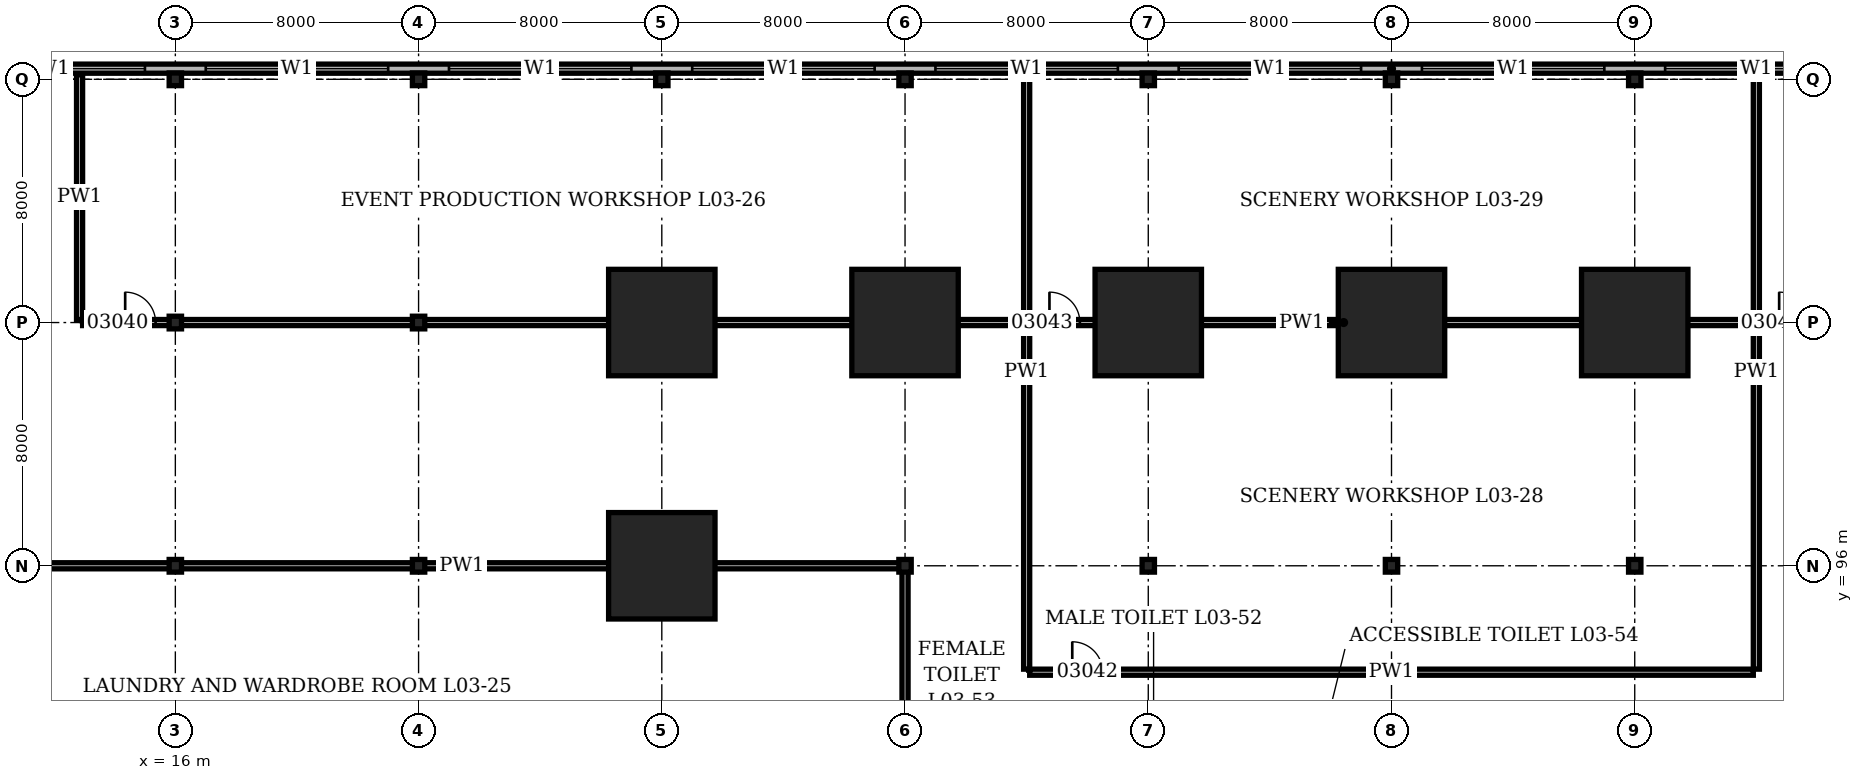
"""IFC4 building model, lengths in metres.
Left out: names, types, materials, properties, quantities, classifications, styles, units other than length and angle.
Written with IfcOpenShell. Run it as: python <this file> out.ifc"""

import sys

from ifc_helpers import new_model, si_unit, direction, frame, frame_2d, origin, origin_2d, place, context, subcontext, project, spatial, rectangle, hollow_rectangle, i_section, extrude, element, fill, save


model = new_model("IFC4")
c1 = context("Model", 3, precision=1e-05, world=origin(), true_north=direction((0.0, 1.0)))
c2 = subcontext(c1, "Body", "Model", "MODEL_VIEW")
j1 = project(units=[si_unit("LENGTHUNIT", "METRE"), si_unit("PLANEANGLEUNIT", "RADIAN")], contexts=[c1])
p1 = place(None, origin())
s1 = spatial("IfcSite", under=j1, at=p1, CompositionType="ELEMENT")
p2 = place(p1, origin())
s2 = spatial("IfcBuilding", under=s1, at=p2, CompositionType="ELEMENT")
p3 = place(p2, frame((0.0, 0.0, 14.9)))
s3 = spatial("IfcBuildingStorey", under=s2, at=p3, CompositionType="ELEMENT", Elevation=14.9)
for number, where, z_axis, x_axis in (
    (1, (16.0, 96.0, 0.0), (0.0, 0.0, 1.0), (1.0, 0.0, 0.0)),
    (2, (16.0, 104.0, 0.0), (0.0, 0.0, 1.0), (1.0, 0.0, 0.0)),
    (3, (16.0, 112.0, 0.0), (0.0, 0.0, 1.0), (1.0, 0.0, 0.0)),
    (4, (24.0, 96.0, 0.0), (0.0, 0.0, 1.0), (1.0, 0.0, 0.0)),
    (5, (24.0, 104.0, 0.0), (0.0, 0.0, 1.0), (1.0, 0.0, 0.0)),
    (6, (24.0, 112.0, 0.0), (0.0, 0.0, 1.0), (1.0, 0.0, 0.0)),
):
    element("IfcColumn", number, at=place(p3, frame(where, z_axis=z_axis, x_axis=x_axis)), inside=s3, PredefinedType="COLUMN", context=c2, shape_type="SweptSolid", body=[
        extrude(i_section(OverallWidth=0.406, OverallDepth=0.417, WebThickness=0.03, FlangeThickness=0.048, at=origin_2d()), origin(), (0.0, 0.0, 1.0), 5.0),
    ])
for number, where, z_axis, x_axis in (
    (7, (32.0, 96.0, 0.0), (0.0, 0.0, 1.0), (1.0, 0.0, 0.0)),
    (8, (32.0, 104.0, 0.0), (0.0, 0.0, 1.0), (1.0, 0.0, 0.0)),
):
    element("IfcColumn", number, at=place(p3, frame(where, z_axis=z_axis, x_axis=x_axis)), inside=s3, PredefinedType="COLUMN", context=c2, shape_type="SweptSolid", body=[
        extrude(hollow_rectangle(XDim=3.5, YDim=3.5, WallThickness=0.5, at=origin_2d()), origin(), (0.0, 0.0, 1.0), 5.0),
    ])
for number, where, z_axis, x_axis in (
    (9, (32.0, 112.0, 0.0), (0.0, 0.0, 1.0), (1.0, 0.0, 0.0)),
    (10, (40.0, 96.0, 0.0), (0.0, 0.0, 1.0), (1.0, 0.0, 0.0)),
):
    element("IfcColumn", number, at=place(p3, frame(where, z_axis=z_axis, x_axis=x_axis)), inside=s3, PredefinedType="COLUMN", context=c2, shape_type="SweptSolid", body=[
        extrude(i_section(OverallWidth=0.406, OverallDepth=0.417, WebThickness=0.03, FlangeThickness=0.048, at=origin_2d()), origin(), (0.0, 0.0, 1.0), 5.0),
    ])
p4 = place(p3, frame((40.0, 104.0, 0.0), z_axis=(0.0, 0.0, 1.0), x_axis=(1.0, 0.0, 0.0)))
e11 = element("IfcColumn", 11, at=p4, inside=s3, PredefinedType="COLUMN", context=c2, shape_type="SweptSolid", body=[
    extrude(hollow_rectangle(XDim=3.5, YDim=3.5, WallThickness=0.5, at=origin_2d()), origin(), (0.0, 0.0, 1.0), 5.0),
])
for number, where, z_axis, x_axis in (
    (12, (40.0, 112.0, 0.0), (0.0, 0.0, 1.0), (1.0, 0.0, 0.0)),
    (13, (48.0, 96.0, 0.0), (0.0, 0.0, 1.0), (1.0, 0.0, 0.0)),
):
    element("IfcColumn", number, at=place(p3, frame(where, z_axis=z_axis, x_axis=x_axis)), inside=s3, PredefinedType="COLUMN", context=c2, shape_type="SweptSolid", body=[
        extrude(i_section(OverallWidth=0.406, OverallDepth=0.417, WebThickness=0.03, FlangeThickness=0.048, at=origin_2d()), origin(), (0.0, 0.0, 1.0), 5.0),
    ])
p5 = place(p3, frame((48.0, 104.0, 0.0), z_axis=(0.0, 0.0, 1.0), x_axis=(1.0, 0.0, 0.0)))
e14 = element("IfcColumn", 14, at=p5, inside=s3, PredefinedType="COLUMN", context=c2, shape_type="SweptSolid", body=[
    extrude(hollow_rectangle(XDim=3.5, YDim=3.5, WallThickness=0.5, at=origin_2d()), origin(), (0.0, 0.0, 1.0), 5.0),
])
for number, where, z_axis, x_axis in (
    (15, (48.0, 112.0, 0.0), (0.0, 0.0, 1.0), (1.0, 0.0, 0.0)),
    (16, (56.0, 96.0, 0.0), (0.0, 0.0, 1.0), (1.0, 0.0, 0.0)),
):
    element("IfcColumn", number, at=place(p3, frame(where, z_axis=z_axis, x_axis=x_axis)), inside=s3, PredefinedType="COLUMN", context=c2, shape_type="SweptSolid", body=[
        extrude(i_section(OverallWidth=0.406, OverallDepth=0.417, WebThickness=0.03, FlangeThickness=0.048, at=origin_2d()), origin(), (0.0, 0.0, 1.0), 5.0),
    ])
p6 = place(p3, frame((56.0, 104.0, 0.0), z_axis=(0.0, 0.0, 1.0), x_axis=(1.0, 0.0, 0.0)))
e17 = element("IfcColumn", 17, at=p6, inside=s3, PredefinedType="COLUMN", context=c2, shape_type="SweptSolid", body=[
    extrude(hollow_rectangle(XDim=3.5, YDim=3.5, WallThickness=0.5, at=origin_2d()), origin(), (0.0, 0.0, 1.0), 5.0),
])
for number, where, z_axis, x_axis in (
    (18, (56.0, 112.0, 0.0), (0.0, 0.0, 1.0), (1.0, 0.0, 0.0)),
    (19, (64.0, 96.0, 0.0), (0.0, 0.0, 1.0), (1.0, 0.0, 0.0)),
):
    element("IfcColumn", number, at=place(p3, frame(where, z_axis=z_axis, x_axis=x_axis)), inside=s3, PredefinedType="COLUMN", context=c2, shape_type="SweptSolid", body=[
        extrude(i_section(OverallWidth=0.406, OverallDepth=0.417, WebThickness=0.03, FlangeThickness=0.048, at=origin_2d()), origin(), (0.0, 0.0, 1.0), 5.0),
    ])
p7 = place(p3, frame((64.0, 104.0, 0.0), z_axis=(0.0, 0.0, 1.0), x_axis=(1.0, 0.0, 0.0)))
e20 = element("IfcColumn", 20, at=p7, inside=s3, PredefinedType="COLUMN", context=c2, shape_type="SweptSolid", body=[
    extrude(hollow_rectangle(XDim=3.5, YDim=3.5, WallThickness=0.5, at=origin_2d()), origin(), (0.0, 0.0, 1.0), 5.0),
])
p8 = place(p3, frame((64.0, 112.0, 0.0), z_axis=(0.0, 0.0, 1.0), x_axis=(1.0, 0.0, 0.0)))
e21 = element("IfcColumn", 21, at=p8, inside=s3, PredefinedType="COLUMN", context=c2, shape_type="SweptSolid", body=[
    extrude(i_section(OverallWidth=0.406, OverallDepth=0.417, WebThickness=0.03, FlangeThickness=0.048, at=origin_2d()), origin(), (0.0, 0.0, 1.0), 5.0),
])
p9 = place(p3, frame((112.35, 112.35, 0.0), z_axis=(0.0, 0.0, 1.0), x_axis=(-1.0, 0.0, 0.0)))
e22 = element("IfcWall", 22, at=p9, inside=s3, PredefinedType="SOLIDWALL", context=c2, shape_type="SweptSolid", body=[
    extrude(rectangle(XDim=112.7, YDim=0.3, at=frame_2d((56.35, 0.0))), origin(), (0.0, 0.0, 1.0), 5.0),
])
p10 = place(p9, frame((1.35, 0.0, 1.0)))
e23 = element("IfcOpeningElement", 23, at=p10, cuts=e22, PredefinedType="OPENING", context=c2, shape_type="SweptSolid", body=[
    extrude(rectangle(XDim=6.0, YDim=1.5, at=frame_2d((3.0, 0.75))), frame((0.0, 0.16, 0.0), z_axis=(0.0, -1.0, 0.0), x_axis=(1.0, 0.0, 0.0)), (0.0, 0.0, 1.0), 0.32),
])
p11 = place(p9, frame((9.35, 0.0, 1.0)))
e24 = element("IfcOpeningElement", 24, at=p11, cuts=e22, PredefinedType="OPENING", context=c2, shape_type="SweptSolid", body=[
    extrude(rectangle(XDim=6.0, YDim=1.5, at=frame_2d((3.0, 0.75))), frame((0.0, 0.16, 0.0), z_axis=(0.0, -1.0, 0.0), x_axis=(1.0, 0.0, 0.0)), (0.0, 0.0, 1.0), 0.32),
])
p12 = place(p9, frame((17.35, 0.0, 1.0)))
e25 = element("IfcOpeningElement", 25, at=p12, cuts=e22, PredefinedType="OPENING", context=c2, shape_type="SweptSolid", body=[
    extrude(rectangle(XDim=6.0, YDim=1.5, at=frame_2d((3.0, 0.75))), frame((0.0, 0.16, 0.0), z_axis=(0.0, -1.0, 0.0), x_axis=(1.0, 0.0, 0.0)), (0.0, 0.0, 1.0), 0.32),
])
p13 = place(p9, frame((25.35, 0.0, 1.0)))
e26 = element("IfcOpeningElement", 26, at=p13, cuts=e22, PredefinedType="OPENING", context=c2, shape_type="SweptSolid", body=[
    extrude(rectangle(XDim=6.0, YDim=1.5, at=frame_2d((3.0, 0.75))), frame((0.0, 0.16, 0.0), z_axis=(0.0, -1.0, 0.0), x_axis=(1.0, 0.0, 0.0)), (0.0, 0.0, 1.0), 0.32),
])
p14 = place(p9, frame((33.35, 0.0, 1.0)))
e27 = element("IfcOpeningElement", 27, at=p14, cuts=e22, PredefinedType="OPENING", context=c2, shape_type="SweptSolid", body=[
    extrude(rectangle(XDim=6.0, YDim=1.5, at=frame_2d((3.0, 0.75))), frame((0.0, 0.16, 0.0), z_axis=(0.0, -1.0, 0.0), x_axis=(1.0, 0.0, 0.0)), (0.0, 0.0, 1.0), 0.32),
])
p15 = place(p9, frame((41.35, 0.0, 1.0)))
e28 = element("IfcOpeningElement", 28, at=p15, cuts=e22, PredefinedType="OPENING", context=c2, shape_type="SweptSolid", body=[
    extrude(rectangle(XDim=6.0, YDim=1.5, at=frame_2d((3.0, 0.75))), frame((0.0, 0.16, 0.0), z_axis=(0.0, -1.0, 0.0), x_axis=(1.0, 0.0, 0.0)), (0.0, 0.0, 1.0), 0.32),
])
p16 = place(p9, frame((49.35, 0.0, 1.0)))
e29 = element("IfcOpeningElement", 29, at=p16, cuts=e22, PredefinedType="OPENING", context=c2, shape_type="SweptSolid", body=[
    extrude(rectangle(XDim=6.0, YDim=1.5, at=frame_2d((3.0, 0.75))), frame((0.0, 0.16, 0.0), z_axis=(0.0, -1.0, 0.0), x_axis=(1.0, 0.0, 0.0)), (0.0, 0.0, 1.0), 0.32),
])
p17 = place(p9, frame((57.35, 0.0, 1.0)))
e30 = element("IfcOpeningElement", 30, at=p17, cuts=e22, PredefinedType="OPENING", context=c2, shape_type="SweptSolid", body=[
    extrude(rectangle(XDim=6.0, YDim=1.5, at=frame_2d((3.0, 0.75))), frame((0.0, 0.16, 0.0), z_axis=(0.0, -1.0, 0.0), x_axis=(1.0, 0.0, 0.0)), (0.0, 0.0, 1.0), 0.32),
])
p18 = place(p9, frame((65.35, 0.0, 1.0)))
e31 = element("IfcOpeningElement", 31, at=p18, cuts=e22, PredefinedType="OPENING", context=c2, shape_type="SweptSolid", body=[
    extrude(rectangle(XDim=6.0, YDim=1.5, at=frame_2d((3.0, 0.75))), frame((0.0, 0.16, 0.0), z_axis=(0.0, -1.0, 0.0), x_axis=(1.0, 0.0, 0.0)), (0.0, 0.0, 1.0), 0.32),
])
p19 = place(p9, frame((73.35, 0.0, 1.0)))
e32 = element("IfcOpeningElement", 32, at=p19, cuts=e22, PredefinedType="OPENING", context=c2, shape_type="SweptSolid", body=[
    extrude(rectangle(XDim=6.0, YDim=1.5, at=frame_2d((3.0, 0.75))), frame((0.0, 0.16, 0.0), z_axis=(0.0, -1.0, 0.0), x_axis=(1.0, 0.0, 0.0)), (0.0, 0.0, 1.0), 0.32),
])
p20 = place(p9, frame((81.35, 0.0, 1.0)))
e33 = element("IfcOpeningElement", 33, at=p20, cuts=e22, PredefinedType="OPENING", context=c2, shape_type="SweptSolid", body=[
    extrude(rectangle(XDim=6.0, YDim=1.5, at=frame_2d((3.0, 0.75))), frame((0.0, 0.16, 0.0), z_axis=(0.0, -1.0, 0.0), x_axis=(1.0, 0.0, 0.0)), (0.0, 0.0, 1.0), 0.32),
])
p21 = place(p9, frame((89.35, 0.0, 1.0)))
e34 = element("IfcOpeningElement", 34, at=p21, cuts=e22, PredefinedType="OPENING", context=c2, shape_type="SweptSolid", body=[
    extrude(rectangle(XDim=6.0, YDim=1.5, at=frame_2d((3.0, 0.75))), frame((0.0, 0.16, 0.0), z_axis=(0.0, -1.0, 0.0), x_axis=(1.0, 0.0, 0.0)), (0.0, 0.0, 1.0), 0.32),
])
p22 = place(p9, frame((97.35, 0.0, 1.0)))
e35 = element("IfcOpeningElement", 35, at=p22, cuts=e22, PredefinedType="OPENING", context=c2, shape_type="SweptSolid", body=[
    extrude(rectangle(XDim=6.0, YDim=1.5, at=frame_2d((3.0, 0.75))), frame((0.0, 0.16, 0.0), z_axis=(0.0, -1.0, 0.0), x_axis=(1.0, 0.0, 0.0)), (0.0, 0.0, 1.0), 0.32),
])
p23 = place(p9, frame((105.35, 0.0, 1.0)))
e36 = element("IfcOpeningElement", 36, at=p23, cuts=e22, PredefinedType="OPENING", context=c2, shape_type="SweptSolid", body=[
    extrude(rectangle(XDim=6.0, YDim=1.5, at=frame_2d((3.0, 0.75))), frame((0.0, 0.16, 0.0), z_axis=(0.0, -1.0, 0.0), x_axis=(1.0, 0.0, 0.0)), (0.0, 0.0, 1.0), 0.32),
])
p24 = place(p3, frame((44.1, 92.5, 0.0), z_axis=(0.0, 0.0, 1.0), x_axis=(1.0, 0.0, 0.0)))
e37 = element("IfcWall", 37, at=p24, inside=s3, PredefinedType="PARTITIONING", context=c2, shape_type="SweptSolid", body=[
    extrude(rectangle(XDim=23.8, YDim=0.2, at=frame_2d((11.9, 0.0))), origin(), (0.0, 0.0, 1.0), 4.8),
])
p25 = place(p24, frame((1.4, 0.0, 0.0)))
e38 = element("IfcOpeningElement", 38, at=p25, cuts=e37, PredefinedType="OPENING", context=c2, shape_type="SweptSolid", body=[
    extrude(rectangle(XDim=1.0, YDim=2.1, at=frame_2d((0.5, 1.05))), frame((0.0, 0.11, 0.0), z_axis=(0.0, -1.0, 0.0), x_axis=(1.0, 0.0, 0.0)), (0.0, 0.0, 1.0), 0.22),
])
p26 = place(p3, frame((10.95, 96.0, 0.0), z_axis=(0.0, 0.0, 1.0), x_axis=(1.0, 0.0, 0.0)))
e39 = element("IfcWall", 39, at=p26, inside=s3, PredefinedType="PARTITIONING", context=c2, shape_type="SweptSolid", body=[
    extrude(rectangle(XDim=28.95, YDim=0.2, at=frame_2d((14.475, 0.0))), origin(), (0.0, 0.0, 1.0), 4.028),
])
p27 = place(p3, frame((12.95, 104.0, 0.0), z_axis=(0.0, 0.0, 1.0), x_axis=(1.0, 0.0, 0.0)))
e40 = element("IfcWall", 40, at=p27, inside=s3, PredefinedType="PARTITIONING", context=c2, shape_type="SweptSolid", body=[
    extrude(rectangle(XDim=82.95, YDim=0.2, at=frame_2d((41.475, 0.0))), origin(), (0.0, 0.0, 1.0), 4.028),
])
p28 = place(p27, frame((1.4, 0.0, 0.0)))
e41 = element("IfcOpeningElement", 41, at=p28, cuts=e40, PredefinedType="OPENING", context=c2, shape_type="SweptSolid", body=[
    extrude(rectangle(XDim=1.0, YDim=2.1, at=frame_2d((0.5, 1.05))), frame((0.0, 0.11, 0.0), z_axis=(0.0, -1.0, 0.0), x_axis=(1.0, 0.0, 0.0)), (0.0, 0.0, 1.0), 0.22),
])
p29 = place(p27, frame((31.8, 0.0, 0.0)))
e42 = element("IfcOpeningElement", 42, at=p29, cuts=e40, PredefinedType="OPENING", context=c2, shape_type="SweptSolid", body=[
    extrude(rectangle(XDim=1.0, YDim=2.1, at=frame_2d((0.5, 1.05))), frame((0.0, 0.11, 0.0), z_axis=(0.0, -1.0, 0.0), x_axis=(1.0, 0.0, 0.0)), (0.0, 0.0, 1.0), 0.22),
])
p30 = place(p27, frame((55.8, 0.0, 0.0)))
e43 = element("IfcOpeningElement", 43, at=p30, cuts=e40, PredefinedType="OPENING", context=c2, shape_type="SweptSolid", body=[
    extrude(rectangle(XDim=1.0, YDim=2.1, at=frame_2d((0.5, 1.05))), frame((0.0, 0.11, 0.0), z_axis=(0.0, -1.0, 0.0), x_axis=(1.0, 0.0, 0.0)), (0.0, 0.0, 1.0), 0.22),
])
p31 = place(p3, frame((12.85, 104.1, 0.0), z_axis=(0.0, 0.0, 1.0), x_axis=(0.0, 1.0, 0.0)))
e44 = element("IfcWall", 44, at=p31, inside=s3, PredefinedType="PARTITIONING", context=c2, shape_type="SweptSolid", body=[
    extrude(rectangle(XDim=8.05, YDim=0.2, at=frame_2d((4.025, 0.0))), origin(), (0.0, 0.0, 1.0), 4.8),
])
p32 = place(p3, frame((40.0, 72.1, 0.0), z_axis=(0.0, 0.0, 1.0), x_axis=(0.0, 1.0, 0.0)))
e45 = element("IfcWall", 45, at=p32, inside=s3, PredefinedType="PARTITIONING", context=c2, shape_type="SweptSolid", body=[
    extrude(rectangle(XDim=23.8, YDim=0.2, at=frame_2d((11.9, 0.0))), origin(), (0.0, 0.0, 1.0), 4.028),
])
p33 = place(p32, frame((17.4, 0.0, 0.0)))
e46 = element("IfcOpeningElement", 46, at=p33, cuts=e45, PredefinedType="OPENING", context=c2, shape_type="SweptSolid", body=[
    extrude(rectangle(XDim=1.0, YDim=2.1, at=frame_2d((0.5, 1.05))), frame((0.0, 0.11, 0.0), z_axis=(0.0, -1.0, 0.0), x_axis=(1.0, 0.0, 0.0)), (0.0, 0.0, 1.0), 0.22),
])
for number, where, z_axis, x_axis in (
    (47, (44.0, 92.6, 0.0), (0.0, 0.0, 1.0), (0.0, 1.0, 0.0)),
    (48, (68.0, 92.6, 0.0), (0.0, 0.0, 1.0), (0.0, 1.0, 0.0)),
):
    element("IfcWall", number, at=place(p3, frame(where, z_axis=z_axis, x_axis=x_axis)), inside=s3, PredefinedType="PARTITIONING", context=c2, shape_type="SweptSolid", body=[
        extrude(rectangle(XDim=19.55, YDim=0.2, at=frame_2d((9.775, 0.0))), origin(), (0.0, 0.0, 1.0), 4.8),
    ])
p34 = place(p15, origin())
e49 = element("IfcWindow", 49, at=p34, inside=s3, PartitioningType="SINGLE_PANEL", PredefinedType="WINDOW", context=c2, shape_type="SweptSolid", body=[
    extrude(rectangle(XDim=6.0, YDim=1.5, at=frame_2d((3.0, 0.75))), frame((0.0, 0.03, 0.0), z_axis=(0.0, -1.0, 0.0), x_axis=(1.0, 0.0, 0.0)), (0.0, 0.0, 1.0), 0.06),
])
fill(e28, e49)
p35 = place(p16, origin())
e50 = element("IfcWindow", 50, at=p35, inside=s3, PartitioningType="SINGLE_PANEL", PredefinedType="WINDOW", context=c2, shape_type="SweptSolid", body=[
    extrude(rectangle(XDim=6.0, YDim=1.5, at=frame_2d((3.0, 0.75))), frame((0.0, 0.03, 0.0), z_axis=(0.0, -1.0, 0.0), x_axis=(1.0, 0.0, 0.0)), (0.0, 0.0, 1.0), 0.06),
])
fill(e29, e50)
p36 = place(p17, origin())
e51 = element("IfcWindow", 51, at=p36, inside=s3, PartitioningType="SINGLE_PANEL", PredefinedType="WINDOW", context=c2, shape_type="SweptSolid", body=[
    extrude(rectangle(XDim=6.0, YDim=1.5, at=frame_2d((3.0, 0.75))), frame((0.0, 0.03, 0.0), z_axis=(0.0, -1.0, 0.0), x_axis=(1.0, 0.0, 0.0)), (0.0, 0.0, 1.0), 0.06),
])
fill(e30, e51)
p37 = place(p18, origin())
e52 = element("IfcWindow", 52, at=p37, inside=s3, PartitioningType="SINGLE_PANEL", PredefinedType="WINDOW", context=c2, shape_type="SweptSolid", body=[
    extrude(rectangle(XDim=6.0, YDim=1.5, at=frame_2d((3.0, 0.75))), frame((0.0, 0.03, 0.0), z_axis=(0.0, -1.0, 0.0), x_axis=(1.0, 0.0, 0.0)), (0.0, 0.0, 1.0), 0.06),
])
fill(e31, e52)
p38 = place(p19, origin())
e53 = element("IfcWindow", 53, at=p38, inside=s3, PartitioningType="SINGLE_PANEL", PredefinedType="WINDOW", context=c2, shape_type="SweptSolid", body=[
    extrude(rectangle(XDim=6.0, YDim=1.5, at=frame_2d((3.0, 0.75))), frame((0.0, 0.03, 0.0), z_axis=(0.0, -1.0, 0.0), x_axis=(1.0, 0.0, 0.0)), (0.0, 0.0, 1.0), 0.06),
])
fill(e32, e53)
p39 = place(p20, origin())
e54 = element("IfcWindow", 54, at=p39, inside=s3, PartitioningType="SINGLE_PANEL", PredefinedType="WINDOW", context=c2, shape_type="SweptSolid", body=[
    extrude(rectangle(XDim=6.0, YDim=1.5, at=frame_2d((3.0, 0.75))), frame((0.0, 0.03, 0.0), z_axis=(0.0, -1.0, 0.0), x_axis=(1.0, 0.0, 0.0)), (0.0, 0.0, 1.0), 0.06),
])
fill(e33, e54)
p40 = place(p21, origin())
e55 = element("IfcWindow", 55, at=p40, inside=s3, PartitioningType="SINGLE_PANEL", PredefinedType="WINDOW", context=c2, shape_type="SweptSolid", body=[
    extrude(rectangle(XDim=6.0, YDim=1.5, at=frame_2d((3.0, 0.75))), frame((0.0, 0.03, 0.0), z_axis=(0.0, -1.0, 0.0), x_axis=(1.0, 0.0, 0.0)), (0.0, 0.0, 1.0), 0.06),
])
fill(e34, e55)
p41 = place(p22, origin())
e56 = element("IfcWindow", 56, at=p41, inside=s3, PartitioningType="SINGLE_PANEL", PredefinedType="WINDOW", context=c2, shape_type="SweptSolid", body=[
    extrude(rectangle(XDim=6.0, YDim=1.5, at=frame_2d((3.0, 0.75))), frame((0.0, 0.03, 0.0), z_axis=(0.0, -1.0, 0.0), x_axis=(1.0, 0.0, 0.0)), (0.0, 0.0, 1.0), 0.06),
])
fill(e35, e56)
p42 = place(p28, origin())
e57 = element("IfcDoor", 57, at=p42, inside=s3, OperationType="SINGLE_SWING_LEFT", PredefinedType="DOOR", context=c2, shape_type="SweptSolid", body=[
    extrude(rectangle(XDim=1.0, YDim=2.1, at=frame_2d((0.5, 1.05))), frame((0.0, 0.1, 0.0), z_axis=(0.0, -1.0, 0.0), x_axis=(1.0, 0.0, 0.0)), (0.0, 0.0, 1.0), 0.199),
])
fill(e41, e57)
p43 = place(p25, origin())
e58 = element("IfcDoor", 58, at=p43, inside=s3, OperationType="SINGLE_SWING_LEFT", PredefinedType="DOOR", context=c2, shape_type="SweptSolid", body=[
    extrude(rectangle(XDim=1.0, YDim=2.1, at=frame_2d((0.5, 1.05))), frame((0.0, 0.1, 0.0), z_axis=(0.0, -1.0, 0.0), x_axis=(1.0, 0.0, 0.0)), (0.0, 0.0, 1.0), 0.199),
])
fill(e38, e58)
p44 = place(p29, origin())
e59 = element("IfcDoor", 59, at=p44, inside=s3, OperationType="SINGLE_SWING_LEFT", PredefinedType="DOOR", context=c2, shape_type="SweptSolid", body=[
    extrude(rectangle(XDim=1.0, YDim=2.1, at=frame_2d((0.5, 1.05))), frame((0.0, 0.1, 0.0), z_axis=(0.0, -1.0, 0.0), x_axis=(1.0, 0.0, 0.0)), (0.0, 0.0, 1.0), 0.199),
])
fill(e42, e59)
p45 = place(p30, origin())
e60 = element("IfcDoor", 60, at=p45, inside=s3, OperationType="SINGLE_SWING_LEFT", PredefinedType="DOOR", context=c2, shape_type="SweptSolid", body=[
    extrude(rectangle(XDim=1.0, YDim=2.1, at=frame_2d((0.5, 1.05))), frame((0.0, 0.1, 0.0), z_axis=(0.0, -1.0, 0.0), x_axis=(1.0, 0.0, 0.0)), (0.0, 0.0, 1.0), 0.199),
])
fill(e43, e60)
save(model, sys.argv[1])
